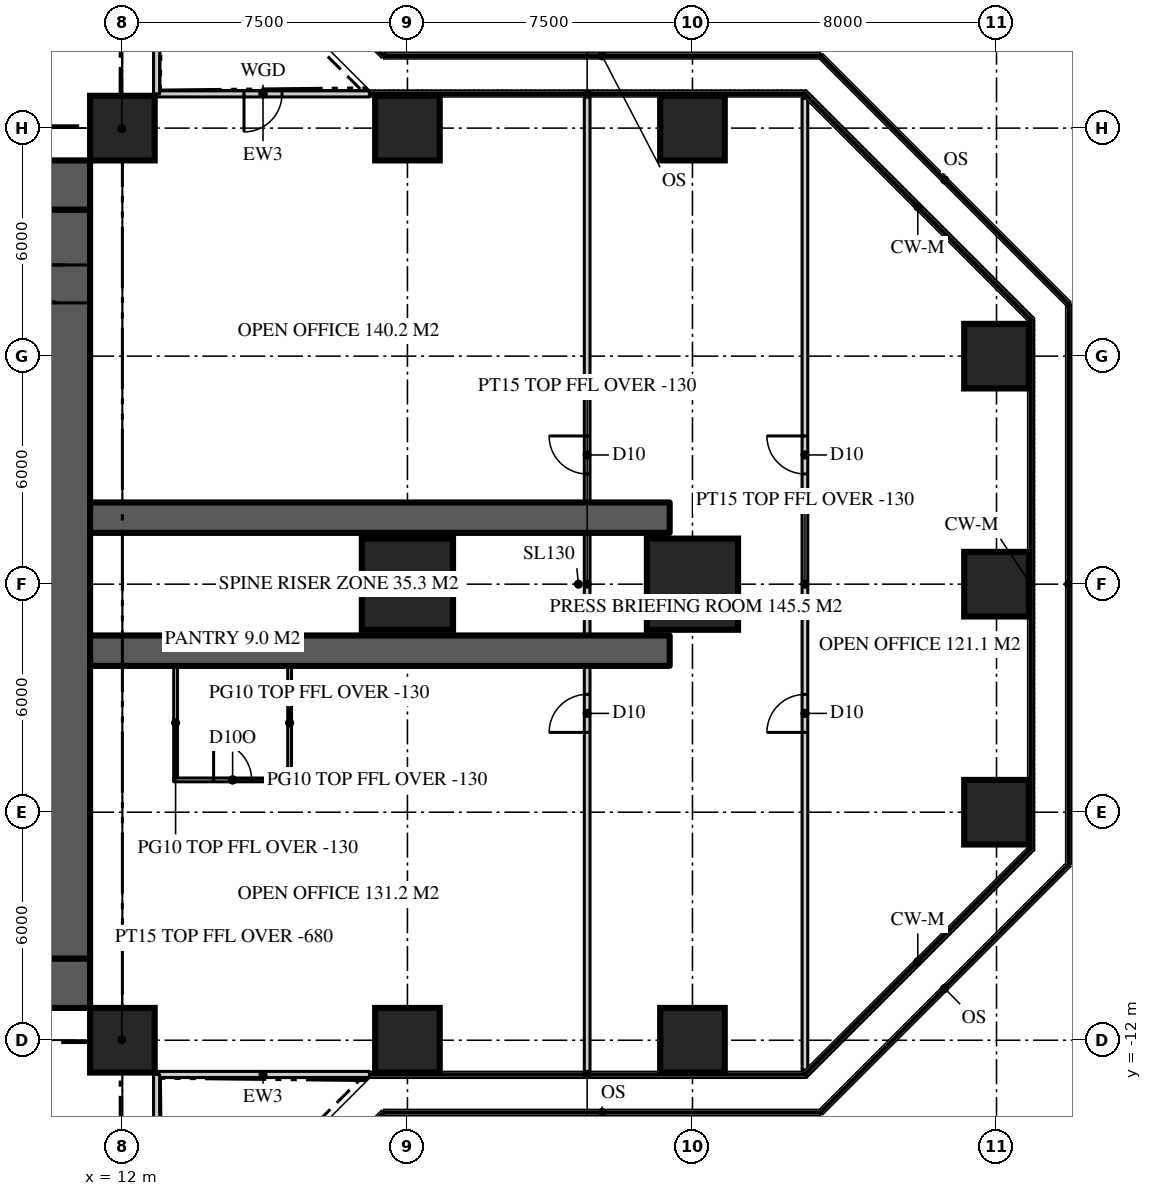
"""IFC4 building model, lengths in metres.
Left out: names, types, materials, properties, quantities, classifications, styles, units other than length and angle.
Written with IfcOpenShell. Run it as: python <this file> out.ifc"""

import sys

from ifc_helpers import new_model, si_unit, direction, frame, frame_2d, origin, origin_2d, place, context, subcontext, project, spatial, rectangle, extrude, element, fill, save


model = new_model("IFC4")
c1 = context("Model", 3, precision=1e-05, world=origin(), true_north=direction((0.0, 1.0)))
c2 = subcontext(c1, "Body", "Model", "MODEL_VIEW")
j1 = project(units=[si_unit("LENGTHUNIT", "METRE"), si_unit("PLANEANGLEUNIT", "RADIAN")], contexts=[c1])
p1 = place(None, origin())
s1 = spatial("IfcSite", under=j1, at=p1, CompositionType="ELEMENT")
p2 = place(p1, origin())
s2 = spatial("IfcBuilding", under=s1, at=p2, CompositionType="ELEMENT")
p3 = place(p2, frame((0.0, 0.0, 174.9)))
s3 = spatial("IfcBuildingStorey", under=s2, at=p3, CompositionType="ELEMENT", Elevation=174.9)
p4 = place(p3, frame((-11.15, 10.5, 0.0), z_axis=(0.0, 0.0, 1.0), x_axis=(1.0, 0.0, 0.0)))
e1 = element("IfcWall", 1, at=p4, inside=s3, PredefinedType="SHEAR", context=c2, shape_type="SweptSolid", body=[
    extrude(rectangle(XDim=22.3, YDim=1.3, at=frame_2d((11.15, 0.0))), origin(), (0.0, 0.0, 1.0), 3.9),
])
p5 = place(p4, frame((4.25, 0.0, 0.0)))
e2 = element("IfcOpeningElement", 2, at=p5, cuts=e1, PredefinedType="OPENING", context=c2, shape_type="SweptSolid", body=[
    extrude(rectangle(XDim=1.8, YDim=2.2, at=frame_2d((0.9, 1.1))), frame((0.0, 0.66, 0.0), z_axis=(0.0, -1.0, 0.0), x_axis=(1.0, 0.0, 0.0)), (0.0, 0.0, 1.0), 1.32),
])
p6 = place(p4, frame((16.25, 0.0, 0.0)))
e3 = element("IfcOpeningElement", 3, at=p6, cuts=e1, PredefinedType="OPENING", context=c2, shape_type="SweptSolid", body=[
    extrude(rectangle(XDim=1.8, YDim=2.2, at=frame_2d((0.9, 1.1))), frame((0.0, 0.66, 0.0), z_axis=(0.0, -1.0, 0.0), x_axis=(1.0, 0.0, 0.0)), (0.0, 0.0, 1.0), 1.32),
])
p7 = place(p3, frame((11.15, -10.5, 0.0), z_axis=(0.0, 0.0, 1.0), x_axis=(-1.0, 0.0, 0.0)))
e4 = element("IfcWall", 4, at=p7, inside=s3, PredefinedType="SHEAR", context=c2, shape_type="SweptSolid", body=[
    extrude(rectangle(XDim=22.3, YDim=1.3, at=frame_2d((11.15, 0.0))), origin(), (0.0, 0.0, 1.0), 3.9),
])
p8 = place(p7, frame((16.25, 0.0, 0.0)))
e5 = element("IfcOpeningElement", 5, at=p8, cuts=e4, PredefinedType="OPENING", context=c2, shape_type="SweptSolid", body=[
    extrude(rectangle(XDim=1.8, YDim=2.2, at=frame_2d((0.9, 1.1))), frame((0.0, 0.66, 0.0), z_axis=(0.0, -1.0, 0.0), x_axis=(1.0, 0.0, 0.0)), (0.0, 0.0, 1.0), 1.32),
])
p9 = place(p7, frame((4.25, 0.0, 0.0)))
e6 = element("IfcOpeningElement", 6, at=p9, cuts=e4, PredefinedType="OPENING", context=c2, shape_type="SweptSolid", body=[
    extrude(rectangle(XDim=1.8, YDim=2.2, at=frame_2d((0.9, 1.1))), frame((0.0, 0.66, 0.0), z_axis=(0.0, -1.0, 0.0), x_axis=(1.0, 0.0, 0.0)), (0.0, 0.0, 1.0), 1.32),
])
p10 = place(p3, frame((10.5, -9.85, 0.0), z_axis=(0.0, 0.0, 1.0), x_axis=(0.0, 1.0, 0.0)))
e7 = element("IfcWall", 7, at=p10, inside=s3, PredefinedType="SHEAR", context=c2, shape_type="SweptSolid", body=[
    extrude(rectangle(XDim=19.7, YDim=1.3, at=frame_2d((9.85, 0.0))), origin(), (0.0, 0.0, 1.0), 3.9),
])
p11 = place(p10, frame((17.25, 0.0, 0.0)))
e8 = element("IfcOpeningElement", 8, at=p11, cuts=e7, PredefinedType="OPENING", context=c2, shape_type="SweptSolid", body=[
    extrude(rectangle(XDim=1.0, YDim=2.2, at=frame_2d((0.5, 1.1))), frame((0.0, 0.66, 0.0), z_axis=(0.0, -1.0, 0.0), x_axis=(1.0, 0.0, 0.0)), (0.0, 0.0, 1.0), 1.32),
])
for number, where, z_axis, x_axis in (
    (9, (11.15, -1.75, 0.0), (0.0, 0.0, 1.0), (1.0, 0.0, 0.0)),
    (10, (11.15, 1.75, 0.0), (0.0, 0.0, 1.0), (1.0, 0.0, 0.0)),
):
    element("IfcWall", number, at=place(p3, frame(where, z_axis=z_axis, x_axis=x_axis)), inside=s3, PredefinedType="SHEAR", context=c2, shape_type="SweptSolid", body=[
        extrude(rectangle(XDim=15.25, YDim=0.8, at=frame_2d((7.625, 0.0))), origin(), (0.0, 0.0, 1.0), 3.9),
    ])
for number, where, z_axis, x_axis in (
    (11, (12.0, -12.0, 0.0), (0.0, 0.0, 1.0), (1.0, 0.0, 0.0)),
    (12, (19.5, -12.0, 0.0), (0.0, 0.0, 1.0), (1.0, 0.0, 0.0)),
    (13, (27.0, -12.0, 0.0), (0.0, 0.0, 1.0), (1.0, 0.0, 0.0)),
    (14, (35.0, -6.0, 0.0), (0.0, 0.0, 1.0), (1.0, 0.0, 0.0)),
):
    element("IfcColumn", number, at=place(p3, frame(where, z_axis=z_axis, x_axis=x_axis)), inside=s3, PredefinedType="COLUMN", context=c2, shape_type="SweptSolid", body=[
        extrude(rectangle(XDim=1.7, YDim=1.7, at=origin_2d()), origin(), (0.0, 0.0, 1.0), 3.9),
    ])
for number, where, z_axis, x_axis in (
    (15, (19.5, 0.0, 0.0), (0.0, 0.0, 1.0), (1.0, 0.0, 0.0)),
    (16, (27.0, 0.0, 0.0), (0.0, 0.0, 1.0), (1.0, 0.0, 0.0)),
):
    element("IfcColumn", number, at=place(p3, frame(where, z_axis=z_axis, x_axis=x_axis)), inside=s3, PredefinedType="COLUMN", context=c2, shape_type="SweptSolid", body=[
        extrude(rectangle(XDim=2.4, YDim=2.4, at=origin_2d()), origin(), (0.0, 0.0, 1.0), 3.9),
    ])
for number, where, z_axis, x_axis in (
    (17, (35.0, 0.0, 0.0), (0.0, 0.0, 1.0), (1.0, 0.0, 0.0)),
    (18, (35.0, 6.0, 0.0), (0.0, 0.0, 1.0), (1.0, 0.0, 0.0)),
    (19, (12.0, 12.0, 0.0), (0.0, 0.0, 1.0), (1.0, 0.0, 0.0)),
    (20, (19.5, 12.0, 0.0), (0.0, 0.0, 1.0), (1.0, 0.0, 0.0)),
    (21, (27.0, 12.0, 0.0), (0.0, 0.0, 1.0), (1.0, 0.0, 0.0)),
):
    element("IfcColumn", number, at=place(p3, frame(where, z_axis=z_axis, x_axis=x_axis)), inside=s3, PredefinedType="COLUMN", context=c2, shape_type="SweptSolid", body=[
        extrude(rectangle(XDim=1.7, YDim=1.7, at=origin_2d()), origin(), (0.0, 0.0, 1.0), 3.9),
    ])
p12 = place(p3, frame((12.9, -12.9, 0.0), z_axis=(0.0, 0.0, 1.0), x_axis=(1.0, 0.0, 0.0)))
e22 = element("IfcWall", 22, at=p12, inside=s3, PredefinedType="SOLIDWALL", context=c2, shape_type="SweptSolid", body=[
    extrude(rectangle(XDim=5.6, YDim=0.16, at=frame_2d((2.8, 0.0))), origin(), (0.0, 0.0, 1.0), 3.77),
])
p13 = place(p3, frame((18.5, 12.9, 0.0), z_axis=(0.0, 0.0, 1.0), x_axis=(-1.0, 0.0, 0.0)))
e23 = element("IfcWall", 23, at=p13, inside=s3, PredefinedType="SOLIDWALL", context=c2, shape_type="SweptSolid", body=[
    extrude(rectangle(XDim=5.6, YDim=0.16, at=frame_2d((2.8, 0.0))), origin(), (0.0, 0.0, 1.0), 3.77),
])
p14 = place(p13, frame((2.3, 0.0, 0.0)))
e24 = element("IfcOpeningElement", 24, at=p14, cuts=e23, PredefinedType="OPENING", context=c2, shape_type="SweptSolid", body=[
    extrude(rectangle(XDim=1.0, YDim=2.2, at=frame_2d((0.5, 1.1))), frame((0.0, 0.09, 0.0), z_axis=(0.0, -1.0, 0.0), x_axis=(1.0, 0.0, 0.0)), (0.0, 0.0, 1.0), 0.18),
])
p15 = place(p3, frame((12.9, 12.9, 0.0), z_axis=(0.0, 0.0, 1.0), x_axis=(0.0, 1.0, 0.0)))
e25 = element("IfcWall", 25, at=p15, inside=s3, PredefinedType="SOLIDWALL", context=c2, shape_type="SweptSolid", body=[
    extrude(rectangle(XDim=5.6, YDim=0.16, at=frame_2d((2.8, 0.0))), origin(), (0.0, 0.0, 1.0), 3.77),
])
p16 = place(p3, frame((12.9, -18.5, 0.0), z_axis=(0.0, 0.0, 1.0), x_axis=(0.0, 1.0, 0.0)))
e26 = element("IfcWall", 26, at=p16, inside=s3, PredefinedType="SOLIDWALL", context=c2, shape_type="SweptSolid", body=[
    extrude(rectangle(XDim=5.6, YDim=0.16, at=frame_2d((2.8, 0.0))), origin(), (0.0, 0.0, 1.0), 3.77),
])
p17 = place(p16, frame((2.3, 0.0, 0.0)))
e27 = element("IfcOpeningElement", 27, at=p17, cuts=e26, PredefinedType="OPENING", context=c2, shape_type="SweptSolid", body=[
    extrude(rectangle(XDim=1.0, YDim=2.2, at=frame_2d((0.5, 1.1))), frame((0.0, 0.09, 0.0), z_axis=(0.0, -1.0, 0.0), x_axis=(1.0, 0.0, 0.0)), (0.0, 0.0, 1.0), 0.18),
])
p18 = place(p3, frame((24.229, -12.82, 0.0), z_axis=(0.0, 0.0, 1.0), x_axis=(0.0, 1.0, 0.0)))
e28 = element("IfcWall", 28, at=p18, inside=s3, PredefinedType="PARTITIONING", context=c2, shape_type="SweptSolid", body=[
    extrude(rectangle(XDim=25.64, YDim=0.15, at=frame_2d((12.82, 0.0))), origin(), (0.0, 0.0, 1.0), 3.77),
])
p19 = place(p18, frame((15.72, 0.0, 0.0)))
e29 = element("IfcOpeningElement", 29, at=p19, cuts=e28, PredefinedType="OPENING", context=c2, shape_type="SweptSolid", body=[
    extrude(rectangle(XDim=1.0, YDim=2.2, at=frame_2d((0.5, 1.1))), frame((0.0, 0.085, 0.0), z_axis=(0.0, -1.0, 0.0), x_axis=(1.0, 0.0, 0.0)), (0.0, 0.0, 1.0), 0.17),
])
p20 = place(p18, frame((8.92, 0.0, 0.0)))
e30 = element("IfcOpeningElement", 30, at=p20, cuts=e28, PredefinedType="OPENING", context=c2, shape_type="SweptSolid", body=[
    extrude(rectangle(XDim=1.0, YDim=2.2, at=frame_2d((0.5, 1.1))), frame((0.0, 0.085, 0.0), z_axis=(0.0, -1.0, 0.0), x_axis=(1.0, 0.0, 0.0)), (0.0, 0.0, 1.0), 0.17),
])
p21 = place(p3, frame((29.959, -12.786, 0.0), z_axis=(0.0, 0.0, 1.0), x_axis=(0.0, 1.0, 0.0)))
e31 = element("IfcWall", 31, at=p21, inside=s3, PredefinedType="PARTITIONING", context=c2, shape_type="SweptSolid", body=[
    extrude(rectangle(XDim=25.573, YDim=0.15, at=frame_2d((12.786, 0.0))), origin(), (0.0, 0.0, 1.0), 3.77),
])
p22 = place(p21, frame((15.687, 0.0, 0.0)))
e32 = element("IfcOpeningElement", 32, at=p22, cuts=e31, PredefinedType="OPENING", context=c2, shape_type="SweptSolid", body=[
    extrude(rectangle(XDim=1.0, YDim=2.2, at=frame_2d((0.5, 1.1))), frame((0.0, 0.085, 0.0), z_axis=(0.0, -1.0, 0.0), x_axis=(1.0, 0.0, 0.0)), (0.0, 0.0, 1.0), 0.17),
])
p23 = place(p21, frame((8.886, 0.0, 0.0)))
e33 = element("IfcOpeningElement", 33, at=p23, cuts=e31, PredefinedType="OPENING", context=c2, shape_type="SweptSolid", body=[
    extrude(rectangle(XDim=1.0, YDim=2.2, at=frame_2d((0.5, 1.1))), frame((0.0, 0.085, 0.0), z_axis=(0.0, -1.0, 0.0), x_axis=(1.0, 0.0, 0.0)), (0.0, 0.0, 1.0), 0.17),
])
for number, where, z_axis, x_axis in (
    (34, (13.4, -2.15, 0.0), (0.0, 0.0, 1.0), (0.0, -1.0, 0.0)),
    (35, (16.4, -2.15, 0.0), (0.0, 0.0, 1.0), (0.0, -1.0, 0.0)),
):
    element("IfcWall", number, at=place(p3, frame(where, z_axis=z_axis, x_axis=x_axis)), inside=s3, PredefinedType="PARTITIONING", context=c2, shape_type="SweptSolid", body=[
        extrude(rectangle(XDim=3.0, YDim=0.1, at=frame_2d((1.5, 0.0))), origin(), (0.0, 0.0, 1.0), 3.77),
    ])
p24 = place(p3, frame((13.35, -5.15, 0.0), z_axis=(0.0, 0.0, 1.0), x_axis=(1.0, 0.0, 0.0)))
e36 = element("IfcWall", 36, at=p24, inside=s3, PredefinedType="PARTITIONING", context=c2, shape_type="SweptSolid", body=[
    extrude(rectangle(XDim=3.1, YDim=0.1, at=frame_2d((1.55, 0.0))), origin(), (0.0, 0.0, 1.0), 3.77),
])
p25 = place(p24, frame((1.05, 0.0, 0.0)))
e37 = element("IfcOpeningElement", 37, at=p25, cuts=e36, PredefinedType="OPENING", context=c2, shape_type="SweptSolid", body=[
    extrude(rectangle(XDim=1.0, YDim=2.2, at=frame_2d((0.5, 1.1))), frame((0.0, 0.06, 0.0), z_axis=(0.0, -1.0, 0.0), x_axis=(1.0, 0.0, 0.0)), (0.0, 0.0, 1.0), 0.12),
])
for number, where, z_axis, x_axis in (
    (38, (11.15, 11.15, 0.0), (0.0, 0.0, 1.0), (0.707, 0.707, 0.0)),
    (39, (11.15, -11.15, 0.0), (0.0, 0.0, 1.0), (0.707, -0.707, 0.0)),
):
    element("IfcWall", number, at=place(p3, frame(where, z_axis=z_axis, x_axis=x_axis)), inside=s3, PredefinedType="PARTITIONING", context=c2, shape_type="SweptSolid", body=[
        extrude(rectangle(XDim=2.362, YDim=0.15, at=frame_2d((1.181, 0.0))), origin(), (0.0, 0.0, 1.0), 3.22),
    ])
p26 = place(p14, origin())
e40 = element("IfcDoor", 40, at=p26, inside=s3, OperationType="SINGLE_SWING_RIGHT", PredefinedType="DOOR", context=c2, shape_type="SweptSolid", body=[
    extrude(rectangle(XDim=1.0, YDim=2.2, at=frame_2d((0.5, 1.1))), frame((0.0, 0.025, 0.0), z_axis=(0.0, -1.0, 0.0), x_axis=(1.0, 0.0, 0.0)), (0.0, 0.0, 1.0), 0.05),
])
fill(e24, e40)
p27 = place(p11, origin())
e41 = element("IfcDoor", 41, at=p27, inside=s3, OperationType="SINGLE_SWING_RIGHT", PredefinedType="DOOR", context=c2, shape_type="SweptSolid", body=[
    extrude(rectangle(XDim=1.0, YDim=2.2, at=frame_2d((0.5, 1.1))), frame((0.0, 0.025, 0.0), z_axis=(0.0, -1.0, 0.0), x_axis=(1.0, 0.0, 0.0)), (0.0, 0.0, 1.0), 0.05),
])
fill(e8, e41)
p28 = place(p19, origin())
e42 = element("IfcDoor", 42, at=p28, inside=s3, OperationType="SINGLE_SWING_RIGHT", PredefinedType="DOOR", context=c2, shape_type="SweptSolid", body=[
    extrude(rectangle(XDim=1.0, YDim=2.2, at=frame_2d((0.5, 1.1))), frame((0.0, 0.025, 0.0), z_axis=(0.0, -1.0, 0.0), x_axis=(1.0, 0.0, 0.0)), (0.0, 0.0, 1.0), 0.05),
])
fill(e29, e42)
p29 = place(p20, origin())
e43 = element("IfcDoor", 43, at=p29, inside=s3, OperationType="SINGLE_SWING_LEFT", PredefinedType="DOOR", context=c2, shape_type="SweptSolid", body=[
    extrude(rectangle(XDim=1.0, YDim=2.2, at=frame_2d((0.5, 1.1))), frame((0.0, 0.025, 0.0), z_axis=(0.0, -1.0, 0.0), x_axis=(1.0, 0.0, 0.0)), (0.0, 0.0, 1.0), 0.05),
])
fill(e30, e43)
p30 = place(p22, origin())
e44 = element("IfcDoor", 44, at=p30, inside=s3, OperationType="SINGLE_SWING_RIGHT", PredefinedType="DOOR", context=c2, shape_type="SweptSolid", body=[
    extrude(rectangle(XDim=1.0, YDim=2.2, at=frame_2d((0.5, 1.1))), frame((0.0, 0.025, 0.0), z_axis=(0.0, -1.0, 0.0), x_axis=(1.0, 0.0, 0.0)), (0.0, 0.0, 1.0), 0.05),
])
fill(e32, e44)
p31 = place(p23, origin())
e45 = element("IfcDoor", 45, at=p31, inside=s3, OperationType="SINGLE_SWING_LEFT", PredefinedType="DOOR", context=c2, shape_type="SweptSolid", body=[
    extrude(rectangle(XDim=1.0, YDim=2.2, at=frame_2d((0.5, 1.1))), frame((0.0, 0.025, 0.0), z_axis=(0.0, -1.0, 0.0), x_axis=(1.0, 0.0, 0.0)), (0.0, 0.0, 1.0), 0.05),
])
fill(e33, e45)
p32 = place(p25, origin())
e46 = element("IfcDoor", 46, at=p32, inside=s3, OperationType="SINGLE_SWING_LEFT", PredefinedType="DOOR", context=c2, shape_type="SweptSolid", body=[
    extrude(rectangle(XDim=1.0, YDim=2.2, at=frame_2d((0.5, 1.1))), frame((0.0, 0.025, 0.0), z_axis=(0.0, -1.0, 0.0), x_axis=(1.0, 0.0, 0.0)), (0.0, 0.0, 1.0), 0.05),
])
fill(e37, e46)
save(model, sys.argv[1])
